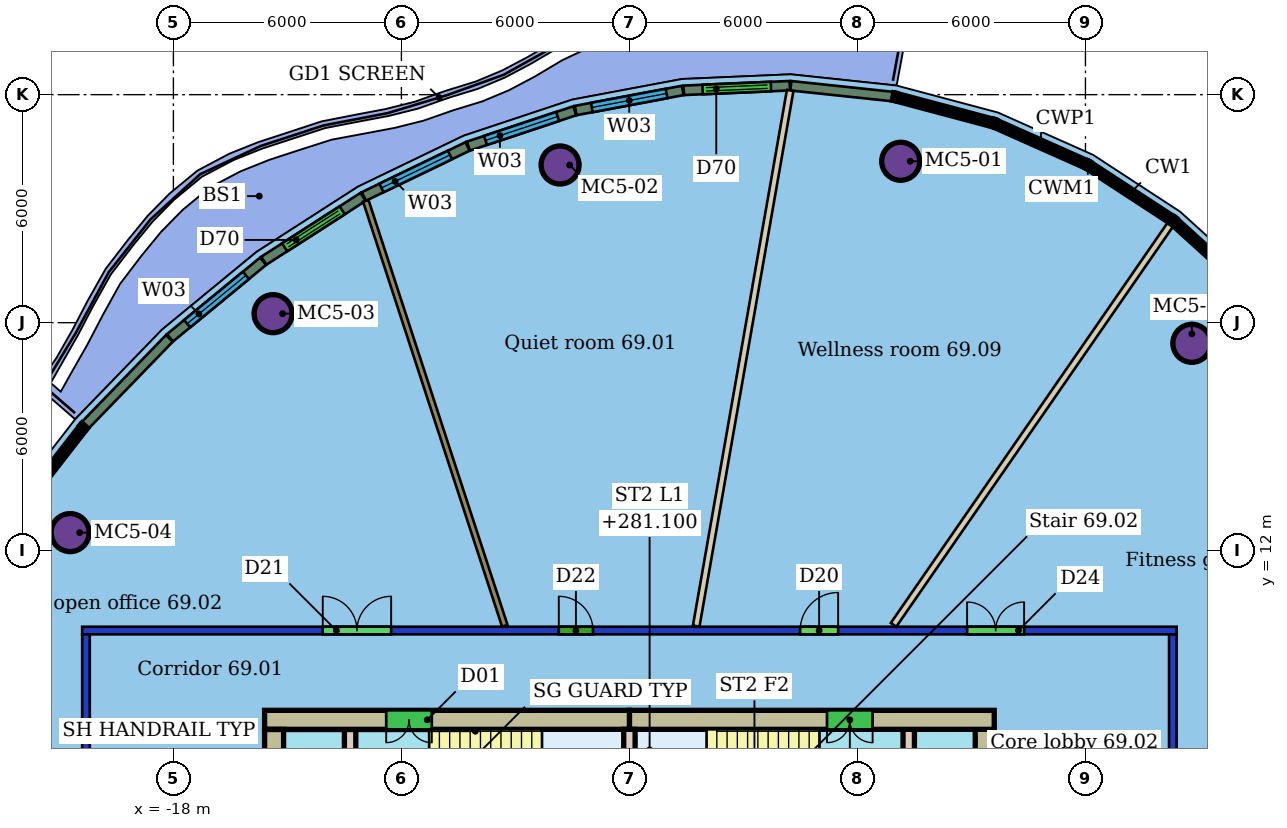
"""IFC4 building model, lengths in metres.
Left out: names, types, materials, properties, quantities, classifications, styles, units other than length and angle.
Written with IfcOpenShell. Run it as: python <this file> out.ifc"""

import sys

from ifc_helpers import new_model, si_unit, direction, frame, frame_2d, origin, origin_2d, place, context, subcontext, project, spatial, rectangle, hollow_circle, extrude, element, fill, save


model = new_model("IFC4")
c1 = context("Model", 3, precision=1e-05, world=origin(), true_north=direction((0.0, 1.0)))
c2 = subcontext(c1, "Body", "Model", "MODEL_VIEW")
j1 = project(units=[si_unit("LENGTHUNIT", "METRE"), si_unit("PLANEANGLEUNIT", "RADIAN")], contexts=[c1])
p1 = place(None, origin())
s1 = spatial("IfcSite", under=j1, at=p1, CompositionType="ELEMENT")
p2 = place(p1, origin())
s2 = spatial("IfcBuilding", under=s1, at=p2, CompositionType="ELEMENT")
p3 = place(p2, frame((0.0, 0.0, 279.3)))
s3 = spatial("IfcBuildingStorey", under=s2, at=p3, CompositionType="ELEMENT", Elevation=279.3)
for number, where, z_axis, x_axis in (
    (1, (1.138, 22.247, 0.0), (0.0, 0.0, 1.0), (1.0, 0.0, 0.0)),
    (2, (-7.825, 22.149, 0.0), (0.0, 0.0, 1.0), (1.0, 0.0, 0.0)),
    (3, (-15.377, 18.238, 0.0), (0.0, 0.0, 1.0), (1.0, 0.0, 0.0)),
    (4, (-20.718, 12.477, 0.0), (0.0, 0.0, 1.0), (1.0, 0.0, 0.0)),
    (5, (8.8, 17.457, 0.0), (0.0, 0.0, 1.0), (1.0, 0.0, 0.0)),
):
    element("IfcColumn", number, at=place(p3, frame(where, z_axis=z_axis, x_axis=x_axis)), inside=s3, PredefinedType="COLUMN", context=c2, shape_type="SweptSolid", body=[
        extrude(hollow_circle(Radius=0.5, WallThickness=0.04, at=origin_2d()), origin(), (0.0, 0.0, 1.0), 3.45),
    ])
p4 = place(p3, frame((-20.3, -9.8, 0.0), z_axis=(0.0, 0.0, 1.0), x_axis=(0.0, 1.0, 0.0)))
e6 = element("IfcWall", 6, at=p4, inside=s3, PredefinedType="PARTITIONING", context=c2, shape_type="SweptSolid", body=[
    extrude(rectangle(XDim=19.6, YDim=0.2, at=frame_2d((9.8, 0.0))), origin(), (0.0, 0.0, 1.0), 3.1),
])
p5 = place(p4, frame((5.619, 0.0, 0.0)))
e7 = element("IfcOpeningElement", 7, at=p5, cuts=e6, PredefinedType="OPENING", context=c2, shape_type="SweptSolid", body=[
    extrude(rectangle(XDim=1.8, YDim=2.4, at=frame_2d((0.9, 1.2))), frame((0.0, 0.11, 0.0), z_axis=(0.0, -1.0, 0.0), x_axis=(1.0, 0.0, 0.0)), (0.0, 0.0, 1.0), 0.22),
])
p6 = place(p3, frame((-20.4, 9.9, 0.0), z_axis=(0.0, 0.0, 1.0), x_axis=(1.0, 0.0, 0.0)))
e8 = element("IfcWall", 8, at=p6, inside=s3, PredefinedType="PARTITIONING", context=c2, shape_type="SweptSolid", body=[
    extrude(rectangle(XDim=28.8, YDim=0.2, at=frame_2d((14.4, 0.0))), origin(), (0.0, 0.0, 1.0), 3.1),
])
p7 = place(p6, frame((12.542, 0.0, 0.0)))
e9 = element("IfcOpeningElement", 9, at=p7, cuts=e8, PredefinedType="OPENING", context=c2, shape_type="SweptSolid", body=[
    extrude(rectangle(XDim=0.9, YDim=2.1, at=frame_2d((0.45, 1.05))), frame((0.0, 0.11, 0.0), z_axis=(0.0, -1.0, 0.0), x_axis=(1.0, 0.0, 0.0)), (0.0, 0.0, 1.0), 0.22),
])
p8 = place(p6, frame((6.33, 0.0, 0.0)))
e10 = element("IfcOpeningElement", 10, at=p8, cuts=e8, PredefinedType="OPENING", context=c2, shape_type="SweptSolid", body=[
    extrude(rectangle(XDim=1.8, YDim=2.1, at=frame_2d((0.9, 1.05))), frame((0.0, 0.11, 0.0), z_axis=(0.0, -1.0, 0.0), x_axis=(1.0, 0.0, 0.0)), (0.0, 0.0, 1.0), 0.22),
])
p9 = place(p6, frame((23.286, 0.0, 0.0)))
e11 = element("IfcOpeningElement", 11, at=p9, cuts=e8, PredefinedType="OPENING", context=c2, shape_type="SweptSolid", body=[
    extrude(rectangle(XDim=1.5, YDim=2.1, at=frame_2d((0.75, 1.05))), frame((0.0, 0.11, 0.0), z_axis=(0.0, -1.0, 0.0), x_axis=(1.0, 0.0, 0.0)), (0.0, 0.0, 1.0), 0.22),
])
p10 = place(p6, frame((18.892, 0.0, 0.0)))
e12 = element("IfcOpeningElement", 12, at=p10, cuts=e8, PredefinedType="OPENING", context=c2, shape_type="SweptSolid", body=[
    extrude(rectangle(XDim=1.0, YDim=2.1, at=frame_2d((0.5, 1.05))), frame((0.0, 0.11, 0.0), z_axis=(0.0, -1.0, 0.0), x_axis=(1.0, 0.0, 0.0)), (0.0, 0.0, 1.0), 0.22),
])
p11 = place(p3, frame((8.3, 9.8, 0.0), z_axis=(0.0, 0.0, 1.0), x_axis=(0.0, -1.0, 0.0)))
e13 = element("IfcWall", 13, at=p11, inside=s3, PredefinedType="PARTITIONING", context=c2, shape_type="SweptSolid", body=[
    extrude(rectangle(XDim=19.6, YDim=0.2, at=frame_2d((9.8, 0.0))), origin(), (0.0, 0.0, 1.0), 3.1),
])
p12 = place(p11, frame((7.656, 0.0, 0.0)))
e14 = element("IfcOpeningElement", 14, at=p12, cuts=e13, PredefinedType="OPENING", context=c2, shape_type="SweptSolid", body=[
    extrude(rectangle(XDim=1.5, YDim=2.4, at=frame_2d((0.75, 1.2))), frame((0.0, 0.11, 0.0), z_axis=(0.0, -1.0, 0.0), x_axis=(1.0, 0.0, 0.0)), (0.0, 0.0, 1.0), 0.22),
])
p13 = place(p3, frame((-1.77, 24.111, 0.0), z_axis=(0.0, 0.0, 1.0), x_axis=(-0.172813995735, -0.984954477566, 0.0)))
e15 = element("IfcWall", 15, at=p13, inside=s3, PredefinedType="PARTITIONING", context=c2, shape_type="SweptSolid", body=[
    extrude(rectangle(XDim=14.311, YDim=0.175, at=frame_2d((7.156, 0.0))), origin(), (0.0, 0.0, 1.0), 3.45),
])
p14 = place(p3, frame((-12.937, 21.207, 0.0), z_axis=(0.0, 0.0, 1.0), x_axis=(0.310907191513, -0.950440276012, 0.0)))
e16 = element("IfcWall", 16, at=p14, inside=s3, PredefinedType="PARTITIONING", context=c2, shape_type="SweptSolid", body=[
    extrude(rectangle(XDim=11.767, YDim=0.15, at=frame_2d((5.884, 0.0))), origin(), (0.0, 0.0, 1.0), 3.45),
])
p15 = place(p3, frame((8.235, 20.583, 0.0), z_axis=(0.0, 0.0, 1.0), x_axis=(-0.568816353784, -0.822464561952, 0.0)))
e17 = element("IfcWall", 17, at=p15, inside=s3, PredefinedType="PARTITIONING", context=c2, shape_type="SweptSolid", body=[
    extrude(rectangle(XDim=12.806, YDim=0.175, at=frame_2d((6.403, 0.0))), origin(), (0.0, 0.0, 1.0), 3.45),
])
p16 = place(p3, frame((0.922, 23.95, 0.0), z_axis=(0.0, 0.0, 1.0), x_axis=(-0.99441306122, 0.105558816192, 0.0)))
e18 = element("IfcWall", 18, at=p16, inside=s3, PredefinedType="SOLIDWALL", context=c2, shape_type="SweptSolid", body=[
    extrude(rectangle(XDim=2.69, YDim=0.25, at=frame_2d((1.345, 0.0))), origin(), (0.0, 0.0, 1.0), 3.15),
])
p17 = place(p3, frame((-1.779, 24.235, 0.0), z_axis=(0.0, 0.0, 1.0), x_axis=(-0.999063892299, -0.043258977142, 0.0)))
e19 = element("IfcWall", 19, at=p17, inside=s3, PredefinedType="SOLIDWALL", context=c2, shape_type="SweptSolid", body=[
    extrude(rectangle(XDim=2.794, YDim=0.25, at=frame_2d((1.397, 0.0))), origin(), (0.0, 0.0, 1.0), 3.15),
])
p18 = place(p17, frame((0.497, 0.0, 0.0)))
e20 = element("IfcOpeningElement", 20, at=p18, cuts=e19, PredefinedType="OPENING", context=c2, shape_type="SweptSolid", body=[
    extrude(rectangle(XDim=1.8, YDim=2.4, at=frame_2d((0.9, 1.2))), frame((0.0, 0.135, 0.0), z_axis=(0.0, -1.0, 0.0), x_axis=(1.0, 0.0, 0.0)), (0.0, 0.0, 1.0), 0.27),
])
p19 = place(p3, frame((-4.596, 24.111, 0.0), z_axis=(0.0, 0.0, 1.0), x_axis=(-0.982821071431, -0.184560942647, 0.0)))
e21 = element("IfcWall", 21, at=p19, inside=s3, PredefinedType="SOLIDWALL", context=c2, shape_type="SweptSolid", body=[
    extrude(rectangle(XDim=2.868, YDim=0.25, at=frame_2d((1.434, 0.0))), origin(), (0.0, 0.0, 1.0), 3.15),
])
p20 = place(p19, frame((0.434, 0.0, 0.9)))
e22 = element("IfcOpeningElement", 22, at=p20, cuts=e21, PredefinedType="OPENING", context=c2, shape_type="SweptSolid", body=[
    extrude(rectangle(XDim=2.0, YDim=2.1, at=frame_2d((1.0, 1.05))), frame((0.0, 0.135, 0.0), z_axis=(0.0, -1.0, 0.0), x_axis=(1.0, 0.0, 0.0)), (0.0, 0.0, 1.0), 0.27),
])
p21 = place(p3, frame((-7.438, 23.576, 0.0), z_axis=(0.0, 0.0, 1.0), x_axis=(-0.948964440236, -0.315383086368, 0.0)))
e23 = element("IfcWall", 23, at=p21, inside=s3, PredefinedType="SOLIDWALL", context=c2, shape_type="SweptSolid", body=[
    extrude(rectangle(XDim=2.948, YDim=0.25, at=frame_2d((1.474, 0.0))), origin(), (0.0, 0.0, 1.0), 3.15),
])
p22 = place(p21, frame((0.474, 0.0, 0.9)))
e24 = element("IfcOpeningElement", 24, at=p22, cuts=e23, PredefinedType="OPENING", context=c2, shape_type="SweptSolid", body=[
    extrude(rectangle(XDim=2.0, YDim=2.1, at=frame_2d((1.0, 1.05))), frame((0.0, 0.135, 0.0), z_axis=(0.0, -1.0, 0.0), x_axis=(1.0, 0.0, 0.0)), (0.0, 0.0, 1.0), 0.27),
])
p23 = place(p3, frame((-10.259, 22.637, 0.0), z_axis=(0.0, 0.0, 1.0), x_axis=(-0.900781065891, -0.434273498308, 0.0)))
e25 = element("IfcWall", 25, at=p23, inside=s3, PredefinedType="SOLIDWALL", context=c2, shape_type="SweptSolid", body=[
    extrude(rectangle(XDim=3.03, YDim=0.25, at=frame_2d((1.515, 0.0))), origin(), (0.0, 0.0, 1.0), 3.15),
])
p24 = place(p23, frame((0.515, 0.0, 0.9)))
e26 = element("IfcOpeningElement", 26, at=p24, cuts=e25, PredefinedType="OPENING", context=c2, shape_type="SweptSolid", body=[
    extrude(rectangle(XDim=2.0, YDim=2.1, at=frame_2d((1.0, 1.05))), frame((0.0, 0.135, 0.0), z_axis=(0.0, -1.0, 0.0), x_axis=(1.0, 0.0, 0.0)), (0.0, 0.0, 1.0), 0.27),
])
p25 = place(p3, frame((-13.008, 21.31, 0.0), z_axis=(0.0, 0.0, 1.0), x_axis=(-0.841150380815, -0.540801291469, 0.0)))
e27 = element("IfcWall", 27, at=p25, inside=s3, PredefinedType="SOLIDWALL", context=c2, shape_type="SweptSolid", body=[
    extrude(rectangle(XDim=3.106, YDim=0.25, at=frame_2d((1.553, 0.0))), origin(), (0.0, 0.0, 1.0), 3.15),
])
p26 = place(p25, frame((0.653, 0.0, 0.0)))
e28 = element("IfcOpeningElement", 28, at=p26, cuts=e27, PredefinedType="OPENING", context=c2, shape_type="SweptSolid", body=[
    extrude(rectangle(XDim=1.8, YDim=2.4, at=frame_2d((0.9, 1.2))), frame((0.0, 0.135, 0.0), z_axis=(0.0, -1.0, 0.0), x_axis=(1.0, 0.0, 0.0)), (0.0, 0.0, 1.0), 0.27),
])
p27 = place(p3, frame((-15.639, 19.617, 0.0), z_axis=(0.0, 0.0, 1.0), x_axis=(-0.772343261753, -0.635205388851, 0.0)))
e29 = element("IfcWall", 29, at=p27, inside=s3, PredefinedType="SOLIDWALL", context=c2, shape_type="SweptSolid", body=[
    extrude(rectangle(XDim=3.172, YDim=0.25, at=frame_2d((1.586, 0.0))), origin(), (0.0, 0.0, 1.0), 3.15),
])
p28 = place(p27, frame((0.586, 0.0, 0.9)))
e30 = element("IfcOpeningElement", 30, at=p28, cuts=e29, PredefinedType="OPENING", context=c2, shape_type="SweptSolid", body=[
    extrude(rectangle(XDim=2.0, YDim=2.1, at=frame_2d((1.0, 1.05))), frame((0.0, 0.135, 0.0), z_axis=(0.0, -1.0, 0.0), x_axis=(1.0, 0.0, 0.0)), (0.0, 0.0, 1.0), 0.27),
])
p29 = place(p3, frame((-18.105, 17.587, 0.0), z_axis=(0.0, 0.0, 1.0), x_axis=(-0.695972067976, -0.718068855053, 0.0)))
e31 = element("IfcWall", 31, at=p29, inside=s3, PredefinedType="SOLIDWALL", context=c2, shape_type="SweptSolid", body=[
    extrude(rectangle(XDim=3.182, YDim=0.25, at=frame_2d((1.591, 0.0))), origin(), (0.0, 0.0, 1.0), 3.15),
])
p30 = place(p3, frame((3.6, 7.55, 0.0), z_axis=(0.0, 0.0, 1.0), x_axis=(-1.0, 0.0, 0.0)))
e32 = element("IfcWall", 32, at=p30, inside=s3, PredefinedType="SHEAR", context=c2, shape_type="SweptSolid", body=[
    extrude(rectangle(XDim=9.6, YDim=0.5, at=frame_2d((4.8, 0.0))), origin(), (0.0, 0.0, 1.0), 3.3),
])
p31 = place(p30, frame((3.2, 0.0, 0.0)))
e33 = element("IfcOpeningElement", 33, at=p31, cuts=e32, PredefinedType="OPENING", context=c2, shape_type="SweptSolid", body=[
    extrude(rectangle(XDim=1.2, YDim=2.1, at=frame_2d((0.6, 1.05))), frame((0.0, 0.26, 0.0), z_axis=(0.0, -1.0, 0.0), x_axis=(1.0, 0.0, 0.0)), (0.0, 0.0, 1.0), 0.52),
])
p32 = place(p3, frame((-6.0, 7.55, 0.0), z_axis=(0.0, 0.0, 1.0), x_axis=(-1.0, 0.0, 0.0)))
e34 = element("IfcWall", 34, at=p32, inside=s3, PredefinedType="SHEAR", context=c2, shape_type="SweptSolid", body=[
    extrude(rectangle(XDim=9.6, YDim=0.5, at=frame_2d((4.8, 0.0))), origin(), (0.0, 0.0, 1.0), 3.3),
])
p33 = place(p32, frame((5.2, 0.0, 0.0)))
e35 = element("IfcOpeningElement", 35, at=p33, cuts=e34, PredefinedType="OPENING", context=c2, shape_type="SweptSolid", body=[
    extrude(rectangle(XDim=1.2, YDim=2.1, at=frame_2d((0.6, 1.05))), frame((0.0, 0.26, 0.0), z_axis=(0.0, -1.0, 0.0), x_axis=(1.0, 0.0, 0.0)), (0.0, 0.0, 1.0), 0.52),
])
p34 = place(p3, frame((-15.35, 7.3, 0.0), z_axis=(0.0, 0.0, 1.0), x_axis=(0.0, -1.0, 0.0)))
e36 = element("IfcWall", 36, at=p34, inside=s3, PredefinedType="SHEAR", context=c2, shape_type="SweptSolid", body=[
    extrude(rectangle(XDim=14.6, YDim=0.5, at=frame_2d((7.3, 0.0))), origin(), (0.0, 0.0, 1.0), 3.3),
])
p35 = place(p34, frame((10.6, 0.0, 0.0)))
e37 = element("IfcOpeningElement", 37, at=p35, cuts=e36, PredefinedType="OPENING", context=c2, shape_type="SweptSolid", body=[
    extrude(rectangle(XDim=1.2, YDim=2.1, at=frame_2d((0.6, 1.05))), frame((0.0, 0.26, 0.0), z_axis=(0.0, -1.0, 0.0), x_axis=(1.0, 0.0, 0.0)), (0.0, 0.0, 1.0), 0.52),
])
p36 = place(p34, frame((2.8, 0.0, 0.0)))
e38 = element("IfcOpeningElement", 38, at=p36, cuts=e36, PredefinedType="OPENING", context=c2, shape_type="SweptSolid", body=[
    extrude(rectangle(XDim=1.2, YDim=2.1, at=frame_2d((0.6, 1.05))), frame((0.0, 0.26, 0.0), z_axis=(0.0, -1.0, 0.0), x_axis=(1.0, 0.0, 0.0)), (0.0, 0.0, 1.0), 0.52),
])
p37 = place(p3, frame((3.35, -7.3, 0.0), z_axis=(0.0, 0.0, 1.0), x_axis=(0.0, 1.0, 0.0)))
e39 = element("IfcWall", 39, at=p37, inside=s3, PredefinedType="SHEAR", context=c2, shape_type="SweptSolid", body=[
    extrude(rectangle(XDim=14.6, YDim=0.5, at=frame_2d((7.3, 0.0))), origin(), (0.0, 0.0, 1.0), 3.3),
])
p38 = place(p37, frame((2.8, 0.0, 0.0)))
e40 = element("IfcOpeningElement", 40, at=p38, cuts=e39, PredefinedType="OPENING", context=c2, shape_type="SweptSolid", body=[
    extrude(rectangle(XDim=1.2, YDim=2.1, at=frame_2d((0.6, 1.05))), frame((0.0, 0.26, 0.0), z_axis=(0.0, -1.0, 0.0), x_axis=(1.0, 0.0, 0.0)), (0.0, 0.0, 1.0), 0.52),
])
p39 = place(p37, frame((10.6, 0.0, 0.0)))
e41 = element("IfcOpeningElement", 41, at=p39, cuts=e39, PredefinedType="OPENING", context=c2, shape_type="SweptSolid", body=[
    extrude(rectangle(XDim=1.2, YDim=2.1, at=frame_2d((0.6, 1.05))), frame((0.0, 0.26, 0.0), z_axis=(0.0, -1.0, 0.0), x_axis=(1.0, 0.0, 0.0)), (0.0, 0.0, 1.0), 0.52),
])
p40 = place(p3, frame((-13.35, 7.3, 0.0), z_axis=(0.0, 0.0, 1.0), x_axis=(0.0, -1.0, 0.0)))
e42 = element("IfcWall", 42, at=p40, inside=s3, PredefinedType="SHEAR", context=c2, shape_type="SweptSolid", body=[
    extrude(rectangle(XDim=14.6, YDim=0.3, at=frame_2d((7.3, 0.0))), origin(), (0.0, 0.0, 1.0), 3.3),
])
p41 = place(p40, frame((6.55, 0.0, 0.0)))
e43 = element("IfcOpeningElement", 43, at=p41, cuts=e42, PredefinedType="OPENING", context=c2, shape_type="SweptSolid", body=[
    extrude(rectangle(XDim=1.5, YDim=2.1, at=frame_2d((0.75, 1.05))), frame((0.0, 0.16, 0.0), z_axis=(0.0, -1.0, 0.0), x_axis=(1.0, 0.0, 0.0)), (0.0, 0.0, 1.0), 0.32),
])
p42 = place(p3, frame((1.35, -7.3, 0.0), z_axis=(0.0, 0.0, 1.0), x_axis=(0.0, 1.0, 0.0)))
e44 = element("IfcWall", 44, at=p42, inside=s3, PredefinedType="SHEAR", context=c2, shape_type="SweptSolid", body=[
    extrude(rectangle(XDim=14.6, YDim=0.3, at=frame_2d((7.3, 0.0))), origin(), (0.0, 0.0, 1.0), 3.3),
])
p43 = place(p42, frame((1.21, 0.0, 0.0)))
e45 = element("IfcOpeningElement", 45, at=p43, cuts=e44, PredefinedType="OPENING", context=c2, shape_type="SweptSolid", body=[
    extrude(rectangle(XDim=1.0, YDim=2.1, at=frame_2d((0.5, 1.05))), frame((0.0, 0.16, 0.0), z_axis=(0.0, -1.0, 0.0), x_axis=(1.0, 0.0, 0.0)), (0.0, 0.0, 1.0), 0.32),
])
p44 = place(p42, frame((6.55, 0.0, 0.0)))
e46 = element("IfcOpeningElement", 46, at=p44, cuts=e44, PredefinedType="OPENING", context=c2, shape_type="SweptSolid", body=[
    extrude(rectangle(XDim=1.5, YDim=2.1, at=frame_2d((0.75, 1.05))), frame((0.0, 0.16, 0.0), z_axis=(0.0, -1.0, 0.0), x_axis=(1.0, 0.0, 0.0)), (0.0, 0.0, 1.0), 0.32),
])
p45 = place(p3, frame((-6.0, 3.88, 0.0), z_axis=(0.0, 0.0, 1.0), x_axis=(0.0, 1.0, 0.0)))
e47 = element("IfcWall", 47, at=p45, inside=s3, PredefinedType="SHEAR", context=c2, shape_type="SweptSolid", body=[
    extrude(rectangle(XDim=3.42, YDim=0.3, at=frame_2d((1.71, 0.0))), origin(), (0.0, 0.0, 1.0), 3.3),
])
p46 = place(p7, origin())
e48 = element("IfcDoor", 48, at=p46, inside=s3, OperationType="SINGLE_SWING_LEFT", PredefinedType="DOOR", context=c2, shape_type="SweptSolid", body=[
    extrude(rectangle(XDim=0.9, YDim=2.1, at=frame_2d((0.45, 1.05))), frame((0.0, 0.025, 0.0), z_axis=(0.0, -1.0, 0.0), x_axis=(1.0, 0.0, 0.0)), (0.0, 0.0, 1.0), 0.05),
])
fill(e9, e48)
p47 = place(p8, origin())
e49 = element("IfcDoor", 49, at=p47, inside=s3, OperationType="DOUBLE_DOOR_SINGLE_SWING", PredefinedType="DOOR", context=c2, shape_type="SweptSolid", body=[
    extrude(rectangle(XDim=1.8, YDim=2.1, at=frame_2d((0.9, 1.05))), frame((0.0, 0.025, 0.0), z_axis=(0.0, -1.0, 0.0), x_axis=(1.0, 0.0, 0.0)), (0.0, 0.0, 1.0), 0.05),
])
fill(e10, e49)
p48 = place(p9, origin())
e50 = element("IfcDoor", 50, at=p48, inside=s3, OperationType="DOUBLE_DOOR_SINGLE_SWING", PredefinedType="DOOR", context=c2, shape_type="SweptSolid", body=[
    extrude(rectangle(XDim=1.5, YDim=2.1, at=frame_2d((0.75, 1.05))), frame((0.0, 0.025, 0.0), z_axis=(0.0, -1.0, 0.0), x_axis=(1.0, 0.0, 0.0)), (0.0, 0.0, 1.0), 0.05),
])
fill(e11, e50)
p49 = place(p10, origin())
e51 = element("IfcDoor", 51, at=p49, inside=s3, OperationType="SINGLE_SWING_RIGHT", PredefinedType="DOOR", context=c2, shape_type="SweptSolid", body=[
    extrude(rectangle(XDim=1.0, YDim=2.1, at=frame_2d((0.5, 1.05))), frame((0.0, 0.025, 0.0), z_axis=(0.0, -1.0, 0.0), x_axis=(1.0, 0.0, 0.0)), (0.0, 0.0, 1.0), 0.05),
])
fill(e12, e51)
p50 = place(p18, origin())
e52 = element("IfcDoor", 52, at=p50, inside=s3, OperationType="DOUBLE_DOOR_SLIDING", PredefinedType="DOOR", context=c2, shape_type="SweptSolid", body=[
    extrude(rectangle(XDim=1.8, YDim=2.4, at=frame_2d((0.9, 1.2))), frame((0.0, 0.025, 0.0), z_axis=(0.0, -1.0, 0.0), x_axis=(1.0, 0.0, 0.0)), (0.0, 0.0, 1.0), 0.05),
])
fill(e20, e52)
p51 = place(p20, origin())
e53 = element("IfcWindow", 53, at=p51, inside=s3, PartitioningType="SINGLE_PANEL", PredefinedType="WINDOW", context=c2, shape_type="SweptSolid", body=[
    extrude(rectangle(XDim=2.0, YDim=2.1, at=frame_2d((1.0, 1.05))), frame((0.0, 0.03, 0.0), z_axis=(0.0, -1.0, 0.0), x_axis=(1.0, 0.0, 0.0)), (0.0, 0.0, 1.0), 0.06),
])
fill(e22, e53)
p52 = place(p22, origin())
e54 = element("IfcWindow", 54, at=p52, inside=s3, PartitioningType="SINGLE_PANEL", PredefinedType="WINDOW", context=c2, shape_type="SweptSolid", body=[
    extrude(rectangle(XDim=2.0, YDim=2.1, at=frame_2d((1.0, 1.05))), frame((0.0, 0.03, 0.0), z_axis=(0.0, -1.0, 0.0), x_axis=(1.0, 0.0, 0.0)), (0.0, 0.0, 1.0), 0.06),
])
fill(e24, e54)
p53 = place(p24, origin())
e55 = element("IfcWindow", 55, at=p53, inside=s3, PartitioningType="SINGLE_PANEL", PredefinedType="WINDOW", context=c2, shape_type="SweptSolid", body=[
    extrude(rectangle(XDim=2.0, YDim=2.1, at=frame_2d((1.0, 1.05))), frame((0.0, 0.03, 0.0), z_axis=(0.0, -1.0, 0.0), x_axis=(1.0, 0.0, 0.0)), (0.0, 0.0, 1.0), 0.06),
])
fill(e26, e55)
p54 = place(p26, origin())
e56 = element("IfcDoor", 56, at=p54, inside=s3, OperationType="DOUBLE_DOOR_SLIDING", PredefinedType="DOOR", context=c2, shape_type="SweptSolid", body=[
    extrude(rectangle(XDim=1.8, YDim=2.4, at=frame_2d((0.9, 1.2))), frame((0.0, 0.025, 0.0), z_axis=(0.0, -1.0, 0.0), x_axis=(1.0, 0.0, 0.0)), (0.0, 0.0, 1.0), 0.05),
])
fill(e28, e56)
p55 = place(p28, origin())
e57 = element("IfcWindow", 57, at=p55, inside=s3, PartitioningType="SINGLE_PANEL", PredefinedType="WINDOW", context=c2, shape_type="SweptSolid", body=[
    extrude(rectangle(XDim=2.0, YDim=2.1, at=frame_2d((1.0, 1.05))), frame((0.0, 0.03, 0.0), z_axis=(0.0, -1.0, 0.0), x_axis=(1.0, 0.0, 0.0)), (0.0, 0.0, 1.0), 0.06),
])
fill(e30, e57)
p56 = place(p31, origin())
e58 = element("IfcDoor", 58, at=p56, inside=s3, OperationType="DOUBLE_DOOR_SINGLE_SWING", PredefinedType="NOTDEFINED", context=c2, shape_type="SweptSolid", body=[
    extrude(rectangle(XDim=1.2, YDim=2.1, at=frame_2d((0.6, 1.05))), frame((0.0, 0.025, 0.0), z_axis=(0.0, -1.0, 0.0), x_axis=(1.0, 0.0, 0.0)), (0.0, 0.0, 1.0), 0.05),
])
fill(e33, e58)
p57 = place(p33, origin())
e59 = element("IfcDoor", 59, at=p57, inside=s3, OperationType="DOUBLE_DOOR_SINGLE_SWING", PredefinedType="NOTDEFINED", context=c2, shape_type="SweptSolid", body=[
    extrude(rectangle(XDim=1.2, YDim=2.1, at=frame_2d((0.6, 1.05))), frame((0.0, 0.025, 0.0), z_axis=(0.0, -1.0, 0.0), x_axis=(1.0, 0.0, 0.0)), (0.0, 0.0, 1.0), 0.05),
])
fill(e35, e59)
save(model, sys.argv[1])
